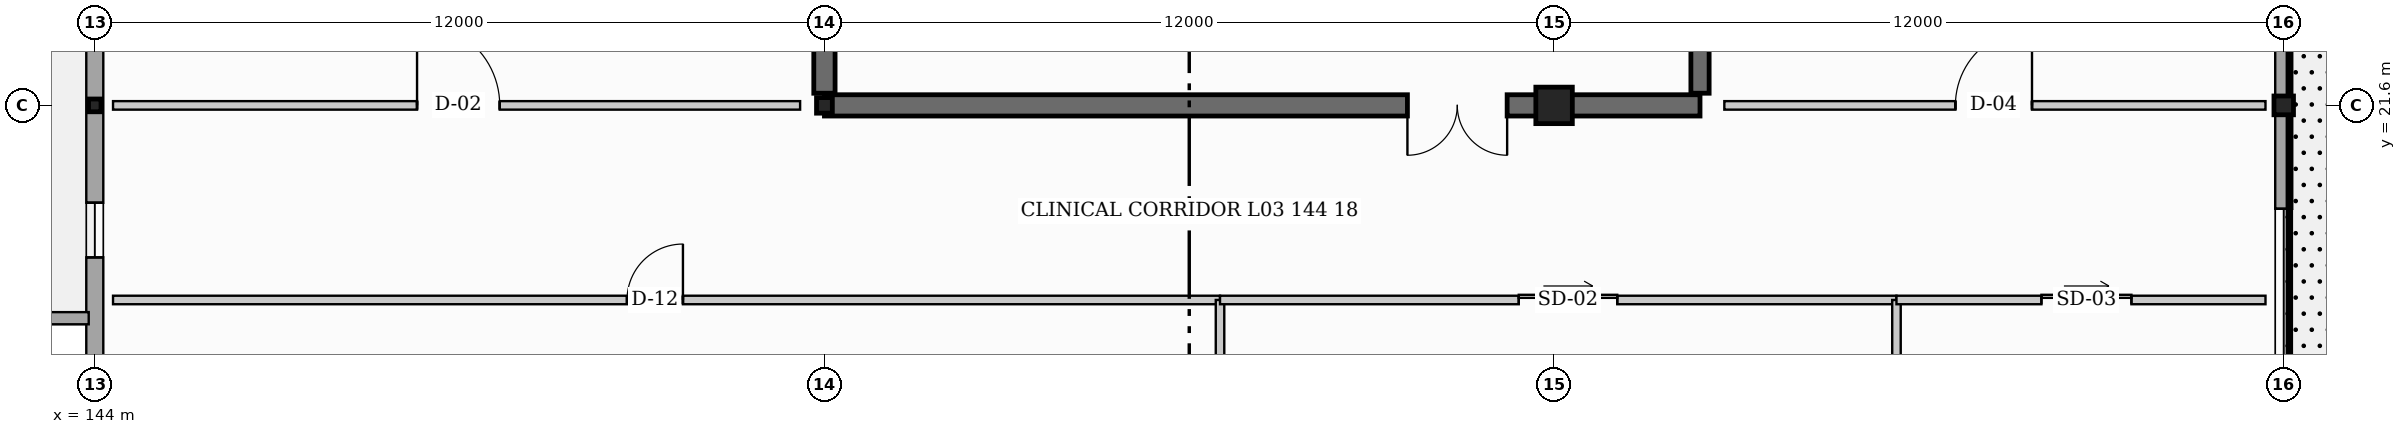
"""IFC4 building model, lengths in metres.
Left out: names, types, materials, properties, quantities, classifications, styles, units other than length and angle.
Written with IfcOpenShell. Run it as: python <this file> out.ifc"""

import sys

from ifc_helpers import new_model, si_unit, direction, frame, frame_2d, origin, origin_2d, place, context, subcontext, project, spatial, rectangle, i_section, extrude, element, fill, save


model = new_model("IFC4")
c1 = context("Model", 3, precision=1e-05, world=origin(), true_north=direction((0.0, 1.0)))
c2 = subcontext(c1, "Body", "Model", "MODEL_VIEW")
j1 = project(units=[si_unit("LENGTHUNIT", "METRE"), si_unit("PLANEANGLEUNIT", "RADIAN")], contexts=[c1])
p1 = place(None, origin())
s1 = spatial("IfcSite", under=j1, at=p1, CompositionType="ELEMENT")
p2 = place(p1, origin())
s2 = spatial("IfcBuilding", under=s1, at=p2, CompositionType="ELEMENT")
p3 = place(p2, frame((0.0, 0.0, 14.4)))
s3 = spatial("IfcBuildingStorey", under=s2, at=p3, CompositionType="ELEMENT", Elevation=14.4)
p4 = place(p3, frame((144.0, 21.6, 0.0), z_axis=(0.0, 0.0, 1.0), x_axis=(1.0, 0.0, 0.0)))
e1 = element("IfcColumn", 1, at=p4, inside=s3, PredefinedType="COLUMN", context=c2, shape_type="SweptSolid", body=[
    extrude(i_section(OverallWidth=0.205, OverallDepth=0.21, WebThickness=0.009, FlangeThickness=0.014, at=origin_2d()), origin(), (0.0, 0.0, 1.0), 3.9),
])
p5 = place(p3, frame((156.0, 21.6, 0.0), z_axis=(0.0, 0.0, 1.0), x_axis=(0.0, 1.0, 0.0)))
e2 = element("IfcColumn", 2, at=p5, inside=s3, PredefinedType="COLUMN", context=c2, shape_type="SweptSolid", body=[
    extrude(i_section(OverallWidth=0.256, OverallDepth=0.26, WebThickness=0.01, FlangeThickness=0.017, at=origin_2d()), origin(), (0.0, 0.0, 1.0), 3.9),
])
p6 = place(p3, frame((168.0, 21.6, 0.0), z_axis=(0.0, 0.0, 1.0), x_axis=(1.0, 0.0, 0.0)))
e3 = element("IfcColumn", 3, at=p6, inside=s3, PredefinedType="COLUMN", context=c2, shape_type="SweptSolid", body=[
    extrude(rectangle(XDim=0.6, YDim=0.6, at=origin_2d()), origin(), (0.0, 0.0, 1.0), 3.9),
])
p7 = place(p3, frame((180.0, 21.6, 0.0), z_axis=(0.0, 0.0, 1.0), x_axis=(0.0, 1.0, 0.0)))
e4 = element("IfcColumn", 4, at=p7, inside=s3, PredefinedType="COLUMN", context=c2, shape_type="SweptSolid", body=[
    extrude(i_section(OverallWidth=0.309, OverallDepth=0.321, WebThickness=0.014, FlangeThickness=0.022, at=origin_2d()), origin(), (0.0, 0.0, 1.0), 3.9),
])
p8 = place(p3, frame((170.4, 21.6, 0.0), z_axis=(0.0, 0.0, 1.0), x_axis=(-1.0, 0.0, 0.0)))
e5 = element("IfcWall", 5, at=p8, inside=s3, PredefinedType="SHEAR", context=c2, shape_type="SweptSolid", body=[
    extrude(rectangle(XDim=14.4, YDim=0.35, at=frame_2d((7.2, 0.0))), origin(), (0.0, 0.0, 1.0), 3.9),
])
p9 = place(p8, frame((3.172, 0.0, 0.0)))
e6 = element("IfcOpeningElement", 6, at=p9, cuts=e5, PredefinedType="OPENING", context=c2, shape_type="SweptSolid", body=[
    extrude(rectangle(XDim=1.64, YDim=2.2, at=frame_2d((0.82, 1.1))), frame((0.0, 0.185, 0.0), z_axis=(0.0, -1.0, 0.0), x_axis=(1.0, 0.0, 0.0)), (0.0, 0.0, 1.0), 0.37),
])
p10 = place(p3, frame((156.0, 21.8, 0.0), z_axis=(0.0, 0.0, 1.0), x_axis=(0.0, 1.0, 0.0)))
e7 = element("IfcWall", 7, at=p10, inside=s3, PredefinedType="SHEAR", context=c2, shape_type="SweptSolid", body=[
    extrude(rectangle(XDim=8.0, YDim=0.35, at=frame_2d((4.0, 0.0))), origin(), (0.0, 0.0, 1.0), 3.9),
])
p11 = place(p3, frame((170.4, 29.8, 0.0), z_axis=(0.0, 0.0, 1.0), x_axis=(0.0, -1.0, 0.0)))
e8 = element("IfcWall", 8, at=p11, inside=s3, PredefinedType="SHEAR", context=c2, shape_type="SweptSolid", body=[
    extrude(rectangle(XDim=8.0, YDim=0.3, at=frame_2d((4.0, 0.0))), origin(), (0.0, 0.0, 1.0), 3.9),
])
p12 = place(p3, frame((180.0, 45.6, 0.0), z_axis=(0.0, 0.0, 1.0), x_axis=(0.0, -1.0, 0.0)))
e9 = element("IfcWall", 9, at=p12, inside=s3, PredefinedType="STANDARD", context=c2, shape_type="SweptSolid", body=[
    extrude(rectangle(XDim=45.6, YDim=0.28, at=frame_2d((22.8, 0.0))), origin(), (0.0, 0.0, 1.0), 3.193),
])
p13 = place(p12, frame((6.0, 0.0, 0.0)))
e10 = element("IfcOpeningElement", 10, at=p13, cuts=e9, PredefinedType="OPENING", context=c2, shape_type="SweptSolid", body=[
    extrude(rectangle(XDim=2.02, YDim=2.2, at=frame_2d((1.01, 1.1))), frame((0.0, 0.15, 0.0), z_axis=(0.0, -1.0, 0.0), x_axis=(1.0, 0.0, 0.0)), (0.0, 0.0, 1.0), 0.3),
])
p14 = place(p12, frame((1.1, 0.0, 0.95)))
e11 = element("IfcOpeningElement", 11, at=p14, cuts=e9, PredefinedType="OPENING", context=c2, shape_type="SweptSolid", body=[
    extrude(rectangle(XDim=2.6, YDim=1.6, at=frame_2d((1.3, 0.8))), frame((0.0, 0.15, 0.0), z_axis=(0.0, -1.0, 0.0), x_axis=(1.0, 0.0, 0.0)), (0.0, 0.0, 1.0), 0.3),
])
p15 = place(p12, frame((13.4, 0.0, 0.95)))
e12 = element("IfcOpeningElement", 12, at=p15, cuts=e9, PredefinedType="OPENING", context=c2, shape_type="SweptSolid", body=[
    extrude(rectangle(XDim=2.6, YDim=1.6, at=frame_2d((1.3, 0.8))), frame((0.0, 0.15, 0.0), z_axis=(0.0, -1.0, 0.0), x_axis=(1.0, 0.0, 0.0)), (0.0, 0.0, 1.0), 0.3),
])
p16 = place(p12, frame((17.5, 0.0, 0.95)))
e13 = element("IfcOpeningElement", 13, at=p16, cuts=e9, PredefinedType="OPENING", context=c2, shape_type="SweptSolid", body=[
    extrude(rectangle(XDim=2.6, YDim=1.6, at=frame_2d((1.3, 0.8))), frame((0.0, 0.15, 0.0), z_axis=(0.0, -1.0, 0.0), x_axis=(1.0, 0.0, 0.0)), (0.0, 0.0, 1.0), 0.3),
])
p17 = place(p12, frame((25.7, 0.0, 0.95)))
e14 = element("IfcOpeningElement", 14, at=p17, cuts=e9, PredefinedType="OPENING", context=c2, shape_type="SweptSolid", body=[
    extrude(rectangle(XDim=2.6, YDim=1.6, at=frame_2d((1.3, 0.8))), frame((0.0, 0.15, 0.0), z_axis=(0.0, -1.0, 0.0), x_axis=(1.0, 0.0, 0.0)), (0.0, 0.0, 1.0), 0.3),
])
p18 = place(p12, frame((29.8, 0.0, 0.95)))
e15 = element("IfcOpeningElement", 15, at=p18, cuts=e9, PredefinedType="OPENING", context=c2, shape_type="SweptSolid", body=[
    extrude(rectangle(XDim=2.6, YDim=1.6, at=frame_2d((1.3, 0.8))), frame((0.0, 0.15, 0.0), z_axis=(0.0, -1.0, 0.0), x_axis=(1.0, 0.0, 0.0)), (0.0, 0.0, 1.0), 0.3),
])
p19 = place(p12, frame((38.0, 0.0, 0.95)))
e16 = element("IfcOpeningElement", 16, at=p19, cuts=e9, PredefinedType="OPENING", context=c2, shape_type="SweptSolid", body=[
    extrude(rectangle(XDim=2.6, YDim=1.6, at=frame_2d((1.3, 0.8))), frame((0.0, 0.15, 0.0), z_axis=(0.0, -1.0, 0.0), x_axis=(1.0, 0.0, 0.0)), (0.0, 0.0, 1.0), 0.3),
])
p20 = place(p3, frame((144.0, 0.0, 0.0), z_axis=(0.0, 0.0, 1.0), x_axis=(0.0, 1.0, 0.0)))
e17 = element("IfcWall", 17, at=p20, inside=s3, PredefinedType="STANDARD", context=c2, shape_type="SweptSolid", body=[
    extrude(rectangle(XDim=45.6, YDim=0.28, at=frame_2d((22.8, 0.0))), origin(), (0.0, 0.0, 1.0), 2.985),
])
p21 = place(p20, frame((1.1, 0.0, 0.95)))
e18 = element("IfcOpeningElement", 18, at=p21, cuts=e17, PredefinedType="OPENING", context=c2, shape_type="SweptSolid", body=[
    extrude(rectangle(XDim=0.9, YDim=1.8, at=frame_2d((0.45, 0.9))), frame((0.0, 0.15, 0.0), z_axis=(0.0, -1.0, 0.0), x_axis=(1.0, 0.0, 0.0)), (0.0, 0.0, 1.0), 0.3),
])
p22 = place(p20, frame((4.7, 0.0, 0.95)))
e19 = element("IfcOpeningElement", 19, at=p22, cuts=e17, PredefinedType="OPENING", context=c2, shape_type="SweptSolid", body=[
    extrude(rectangle(XDim=0.9, YDim=1.8, at=frame_2d((0.45, 0.9))), frame((0.0, 0.15, 0.0), z_axis=(0.0, -1.0, 0.0), x_axis=(1.0, 0.0, 0.0)), (0.0, 0.0, 1.0), 0.3),
])
p23 = place(p20, frame((8.3, 0.0, 0.95)))
e20 = element("IfcOpeningElement", 20, at=p23, cuts=e17, PredefinedType="OPENING", context=c2, shape_type="SweptSolid", body=[
    extrude(rectangle(XDim=0.9, YDim=1.8, at=frame_2d((0.45, 0.9))), frame((0.0, 0.15, 0.0), z_axis=(0.0, -1.0, 0.0), x_axis=(1.0, 0.0, 0.0)), (0.0, 0.0, 1.0), 0.3),
])
p24 = place(p20, frame((11.9, 0.0, 0.95)))
e21 = element("IfcOpeningElement", 21, at=p24, cuts=e17, PredefinedType="OPENING", context=c2, shape_type="SweptSolid", body=[
    extrude(rectangle(XDim=0.9, YDim=1.8, at=frame_2d((0.45, 0.9))), frame((0.0, 0.15, 0.0), z_axis=(0.0, -1.0, 0.0), x_axis=(1.0, 0.0, 0.0)), (0.0, 0.0, 1.0), 0.3),
])
p25 = place(p20, frame((15.5, 0.0, 0.95)))
e22 = element("IfcOpeningElement", 22, at=p25, cuts=e17, PredefinedType="OPENING", context=c2, shape_type="SweptSolid", body=[
    extrude(rectangle(XDim=0.9, YDim=1.8, at=frame_2d((0.45, 0.9))), frame((0.0, 0.15, 0.0), z_axis=(0.0, -1.0, 0.0), x_axis=(1.0, 0.0, 0.0)), (0.0, 0.0, 1.0), 0.3),
])
p26 = place(p20, frame((19.1, 0.0, 0.95)))
e23 = element("IfcOpeningElement", 23, at=p26, cuts=e17, PredefinedType="OPENING", context=c2, shape_type="SweptSolid", body=[
    extrude(rectangle(XDim=0.9, YDim=1.8, at=frame_2d((0.45, 0.9))), frame((0.0, 0.15, 0.0), z_axis=(0.0, -1.0, 0.0), x_axis=(1.0, 0.0, 0.0)), (0.0, 0.0, 1.0), 0.3),
])
p27 = place(p20, frame((22.7, 0.0, 0.95)))
e24 = element("IfcOpeningElement", 24, at=p27, cuts=e17, PredefinedType="OPENING", context=c2, shape_type="SweptSolid", body=[
    extrude(rectangle(XDim=0.9, YDim=1.8, at=frame_2d((0.45, 0.9))), frame((0.0, 0.15, 0.0), z_axis=(0.0, -1.0, 0.0), x_axis=(1.0, 0.0, 0.0)), (0.0, 0.0, 1.0), 0.3),
])
p28 = place(p20, frame((26.3, 0.0, 0.95)))
e25 = element("IfcOpeningElement", 25, at=p28, cuts=e17, PredefinedType="OPENING", context=c2, shape_type="SweptSolid", body=[
    extrude(rectangle(XDim=0.9, YDim=1.8, at=frame_2d((0.45, 0.9))), frame((0.0, 0.15, 0.0), z_axis=(0.0, -1.0, 0.0), x_axis=(1.0, 0.0, 0.0)), (0.0, 0.0, 1.0), 0.3),
])
p29 = place(p20, frame((29.9, 0.0, 0.95)))
e26 = element("IfcOpeningElement", 26, at=p29, cuts=e17, PredefinedType="OPENING", context=c2, shape_type="SweptSolid", body=[
    extrude(rectangle(XDim=0.9, YDim=1.8, at=frame_2d((0.45, 0.9))), frame((0.0, 0.15, 0.0), z_axis=(0.0, -1.0, 0.0), x_axis=(1.0, 0.0, 0.0)), (0.0, 0.0, 1.0), 0.3),
])
p30 = place(p20, frame((37.1, 0.0, 0.95)))
e27 = element("IfcOpeningElement", 27, at=p30, cuts=e17, PredefinedType="OPENING", context=c2, shape_type="SweptSolid", body=[
    extrude(rectangle(XDim=0.9, YDim=1.8, at=frame_2d((0.45, 0.9))), frame((0.0, 0.15, 0.0), z_axis=(0.0, -1.0, 0.0), x_axis=(1.0, 0.0, 0.0)), (0.0, 0.0, 1.0), 0.3),
])
p31 = place(p20, frame((40.7, 0.0, 0.95)))
e28 = element("IfcOpeningElement", 28, at=p31, cuts=e17, PredefinedType="OPENING", context=c2, shape_type="SweptSolid", body=[
    extrude(rectangle(XDim=0.9, YDim=1.8, at=frame_2d((0.45, 0.9))), frame((0.0, 0.15, 0.0), z_axis=(0.0, -1.0, 0.0), x_axis=(1.0, 0.0, 0.0)), (0.0, 0.0, 1.0), 0.3),
])
p32 = place(p3, frame((143.9, 18.1, 0.31), z_axis=(0.0, 0.0, 1.0), x_axis=(-1.0, 0.0, 0.0)))
e29 = element("IfcWall", 29, at=p32, inside=s3, PredefinedType="PARAPET", context=c2, shape_type="SweptSolid", body=[
    extrude(rectangle(XDim=11.8, YDim=0.2, at=frame_2d((5.9, 0.0))), origin(), (0.0, 0.0, 1.0), 1.12),
])
p33 = place(p3, frame((144.3, 18.4, 0.0), z_axis=(0.0, 0.0, 1.0), x_axis=(1.0, 0.0, 0.0)))
e30 = element("IfcWall", 30, at=p33, inside=s3, PredefinedType="PARTITIONING", context=c2, shape_type="SweptSolid", body=[
    extrude(rectangle(XDim=18.206, YDim=0.14, at=frame_2d((9.103, 0.0))), origin(), (0.0, 0.0, 1.0), 3.273),
])
p34 = place(p33, frame((8.453, 0.0, 0.0)))
e31 = element("IfcOpeningElement", 31, at=p34, cuts=e30, PredefinedType="OPENING", context=c2, shape_type="SweptSolid", body=[
    extrude(rectangle(XDim=0.92, YDim=2.04, at=frame_2d((0.46, 1.02))), frame((0.0, 0.08, 0.0), z_axis=(0.0, -1.0, 0.0), x_axis=(1.0, 0.0, 0.0)), (0.0, 0.0, 1.0), 0.16),
])
p35 = place(p3, frame((162.506, 0.3, 0.0), z_axis=(0.0, 0.0, 1.0), x_axis=(0.0, 1.0, 0.0)))
e32 = element("IfcWall", 32, at=p35, inside=s3, PredefinedType="PARTITIONING", context=c2, shape_type="SweptSolid", body=[
    extrude(rectangle(XDim=18.1, YDim=0.14, at=frame_2d((9.05, 0.0))), origin(), (0.0, 0.0, 1.0), 2.985),
])
p36 = place(p3, frame((162.506, 18.4, 0.0), z_axis=(0.0, 0.0, 1.0), x_axis=(1.0, 0.0, 0.0)))
e33 = element("IfcWall", 33, at=p36, inside=s3, PredefinedType="PARTITIONING", context=c2, shape_type="SweptSolid", body=[
    extrude(rectangle(XDim=11.125, YDim=0.14, at=frame_2d((5.562, 0.0))), origin(), (0.0, 0.0, 1.0), 3.283),
])
p37 = place(p36, frame((4.913, 0.0, 0.0)))
e34 = element("IfcOpeningElement", 34, at=p37, cuts=e33, PredefinedType="OPENING", context=c2, shape_type="SweptSolid", body=[
    extrude(rectangle(XDim=1.62, YDim=2.3, at=frame_2d((0.81, 1.15))), frame((0.0, 0.08, 0.0), z_axis=(0.0, -1.0, 0.0), x_axis=(1.0, 0.0, 0.0)), (0.0, 0.0, 1.0), 0.16),
])
p38 = place(p3, frame((173.631, 0.3, 0.0), z_axis=(0.0, 0.0, 1.0), x_axis=(0.0, 1.0, 0.0)))
e35 = element("IfcWall", 35, at=p38, inside=s3, PredefinedType="PARTITIONING", context=c2, shape_type="SweptSolid", body=[
    extrude(rectangle(XDim=18.1, YDim=0.14, at=frame_2d((9.05, 0.0))), origin(), (0.0, 0.0, 1.0), 3.193),
])
p39 = place(p3, frame((173.631, 18.4, 0.0), z_axis=(0.0, 0.0, 1.0), x_axis=(1.0, 0.0, 0.0)))
e36 = element("IfcWall", 36, at=p39, inside=s3, PredefinedType="PARTITIONING", context=c2, shape_type="SweptSolid", body=[
    extrude(rectangle(XDim=6.069, YDim=0.14, at=frame_2d((3.034, 0.0))), origin(), (0.0, 0.0, 1.0), 3.352),
])
p40 = place(p39, frame((2.384, 0.0, 0.0)))
e37 = element("IfcOpeningElement", 37, at=p40, cuts=e36, PredefinedType="OPENING", context=c2, shape_type="SweptSolid", body=[
    extrude(rectangle(XDim=1.48, YDim=2.26, at=frame_2d((0.74, 1.13))), frame((0.0, 0.08, 0.0), z_axis=(0.0, -1.0, 0.0), x_axis=(1.0, 0.0, 0.0)), (0.0, 0.0, 1.0), 0.16),
])
p41 = place(p3, frame((144.3, 21.6, 0.0), z_axis=(0.0, 0.0, 1.0), x_axis=(1.0, 0.0, 0.0)))
e38 = element("IfcWall", 38, at=p41, inside=s3, PredefinedType="PARTITIONING", context=c2, shape_type="SweptSolid", body=[
    extrude(rectangle(XDim=11.3, YDim=0.14, at=frame_2d((5.65, 0.0))), origin(), (0.0, 0.0, 1.0), 2.985),
])
p42 = place(p41, frame((5.0, 0.0, 0.0)))
e39 = element("IfcOpeningElement", 39, at=p42, cuts=e38, PredefinedType="OPENING", context=c2, shape_type="SweptSolid", body=[
    extrude(rectangle(XDim=1.36, YDim=2.18, at=frame_2d((0.68, 1.09))), frame((0.0, 0.08, 0.0), z_axis=(0.0, -1.0, 0.0), x_axis=(1.0, 0.0, 0.0)), (0.0, 0.0, 1.0), 0.16),
])
p43 = place(p3, frame((170.8, 21.6, 0.0), z_axis=(0.0, 0.0, 1.0), x_axis=(1.0, 0.0, 0.0)))
e40 = element("IfcWall", 40, at=p43, inside=s3, PredefinedType="PARTITIONING", context=c2, shape_type="SweptSolid", body=[
    extrude(rectangle(XDim=8.9, YDim=0.14, at=frame_2d((4.45, 0.0))), origin(), (0.0, 0.0, 1.0), 3.273),
])
p44 = place(p43, frame((3.8, 0.0, 0.0)))
e41 = element("IfcOpeningElement", 41, at=p44, cuts=e40, PredefinedType="OPENING", context=c2, shape_type="SweptSolid", body=[
    extrude(rectangle(XDim=1.26, YDim=2.14, at=frame_2d((0.63, 1.07))), frame((0.0, 0.08, 0.0), z_axis=(0.0, -1.0, 0.0), x_axis=(1.0, 0.0, 0.0)), (0.0, 0.0, 1.0), 0.16),
])
p45 = place(p17, origin())
e42 = element("IfcWindow", 42, at=p45, inside=s3, PartitioningType="TRIPLE_PANEL_VERTICAL", PredefinedType="WINDOW", context=c2, shape_type="SweptSolid", body=[
    extrude(rectangle(XDim=2.6, YDim=1.6, at=frame_2d((1.3, 0.8))), frame((0.0, 0.03, 0.0), z_axis=(0.0, -1.0, 0.0), x_axis=(1.0, 0.0, 0.0)), (0.0, 0.0, 1.0), 0.06),
])
fill(e14, e42)
p46 = place(p26, origin())
e43 = element("IfcWindow", 43, at=p46, inside=s3, PartitioningType="SINGLE_PANEL", PredefinedType="WINDOW", context=c2, shape_type="SweptSolid", body=[
    extrude(rectangle(XDim=0.9, YDim=1.8, at=frame_2d((0.45, 0.9))), frame((0.0, 0.03, 0.0), z_axis=(0.0, -1.0, 0.0), x_axis=(1.0, 0.0, 0.0)), (0.0, 0.0, 1.0), 0.06),
])
fill(e23, e43)
p47 = place(p9, origin())
e44 = element("IfcDoor", 44, at=p47, inside=s3, OperationType="DOUBLE_DOOR_SINGLE_SWING", PredefinedType="DOOR", context=c2, shape_type="SweptSolid", body=[
    extrude(rectangle(XDim=1.64, YDim=2.2, at=frame_2d((0.82, 1.1))), frame((0.0, 0.025, 0.0), z_axis=(0.0, -1.0, 0.0), x_axis=(1.0, 0.0, 0.0)), (0.0, 0.0, 1.0), 0.05),
])
fill(e6, e44)
p48 = place(p34, origin())
e45 = element("IfcDoor", 45, at=p48, inside=s3, OperationType="SINGLE_SWING_RIGHT", PredefinedType="DOOR", context=c2, shape_type="SweptSolid", body=[
    extrude(rectangle(XDim=0.92, YDim=2.04, at=frame_2d((0.46, 1.02))), frame((0.0, 0.025, 0.0), z_axis=(0.0, -1.0, 0.0), x_axis=(1.0, 0.0, 0.0)), (0.0, 0.0, 1.0), 0.05),
])
fill(e31, e45)
p49 = place(p37, origin())
e46 = element("IfcDoor", 46, at=p49, inside=s3, OperationType="SLIDING_TO_RIGHT", PredefinedType="DOOR", context=c2, shape_type="SweptSolid", body=[
    extrude(rectangle(XDim=1.62, YDim=2.3, at=frame_2d((0.81, 1.15))), frame((0.0, 0.025, 0.0), z_axis=(0.0, -1.0, 0.0), x_axis=(1.0, 0.0, 0.0)), (0.0, 0.0, 1.0), 0.05),
])
fill(e34, e46)
p50 = place(p40, origin())
e47 = element("IfcDoor", 47, at=p50, inside=s3, OperationType="SLIDING_TO_LEFT", PredefinedType="DOOR", context=c2, shape_type="SweptSolid", body=[
    extrude(rectangle(XDim=1.48, YDim=2.26, at=frame_2d((0.74, 1.13))), frame((0.0, 0.025, 0.0), z_axis=(0.0, -1.0, 0.0), x_axis=(1.0, 0.0, 0.0)), (0.0, 0.0, 1.0), 0.05),
])
fill(e37, e47)
p51 = place(p42, origin())
e48 = element("IfcDoor", 48, at=p51, inside=s3, OperationType="SINGLE_SWING_LEFT", PredefinedType="DOOR", context=c2, shape_type="SweptSolid", body=[
    extrude(rectangle(XDim=1.36, YDim=2.18, at=frame_2d((0.68, 1.09))), frame((0.0, 0.025, 0.0), z_axis=(0.0, -1.0, 0.0), x_axis=(1.0, 0.0, 0.0)), (0.0, 0.0, 1.0), 0.05),
])
fill(e39, e48)
p52 = place(p44, origin())
e49 = element("IfcDoor", 49, at=p52, inside=s3, OperationType="SINGLE_SWING_RIGHT", PredefinedType="DOOR", context=c2, shape_type="SweptSolid", body=[
    extrude(rectangle(XDim=1.26, YDim=2.14, at=frame_2d((0.63, 1.07))), frame((0.0, 0.025, 0.0), z_axis=(0.0, -1.0, 0.0), x_axis=(1.0, 0.0, 0.0)), (0.0, 0.0, 1.0), 0.05),
])
fill(e41, e49)
save(model, sys.argv[1])
